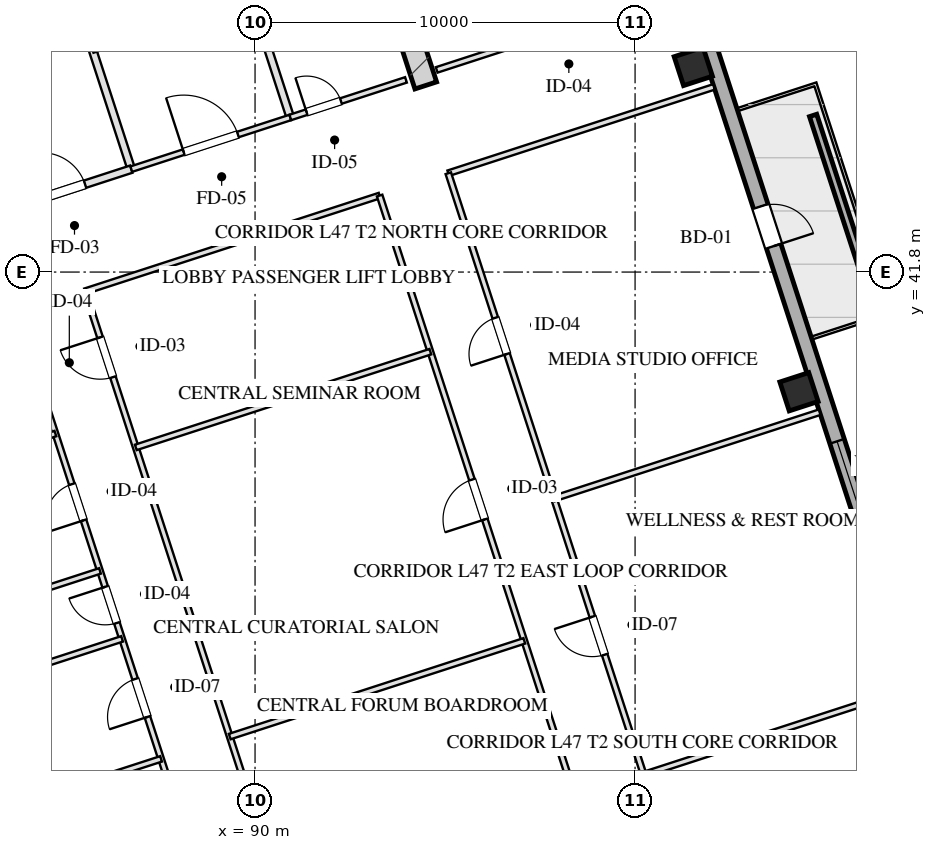
"""IFC4 building model, lengths in metres.
Left out: names, types, materials, properties, quantities, classifications, styles, units other than length and angle.
Written with IfcOpenShell. Run it as: python <this file> out.ifc"""

import sys

from ifc_helpers import new_model, si_unit, direction, frame, frame_2d, origin, origin_2d, place, context, subcontext, project, spatial, rectangle, hollow_rectangle, extrude, element, fill, save


model = new_model("IFC4")
c1 = context("Model", 3, precision=1e-05, world=origin(), true_north=direction((0.0, 1.0)))
c2 = subcontext(c1, "Body", "Model", "MODEL_VIEW")
j1 = project(units=[si_unit("LENGTHUNIT", "METRE"), si_unit("PLANEANGLEUNIT", "RADIAN")], contexts=[c1])
p1 = place(None, origin())
s1 = spatial("IfcSite", under=j1, at=p1, CompositionType="ELEMENT")
p2 = place(p1, origin())
s2 = spatial("IfcBuilding", under=s1, at=p2, CompositionType="ELEMENT")
p3 = place(p2, frame((0.0, 0.0, 177.1)))
s3 = spatial("IfcBuildingStorey", under=s2, at=p3, CompositionType="ELEMENT", Elevation=177.1)
p4 = place(p3, frame((94.492, 46.71, 0.0), z_axis=(0.0, 0.0, 1.0), x_axis=(-0.309010370028, 0.95105866865, 0.0)))
e1 = element("IfcWall", 1, at=p4, inside=s3, PredefinedType="SHEAR", context=c2, shape_type="SweptSolid", body=[
    extrude(rectangle(XDim=9.48, YDim=0.6, at=frame_2d((4.74, 0.0))), origin(), (0.0, 0.0, 1.0), 3.45),
])
for number, where, z_axis, x_axis in (
    (2, (104.313, 38.651, 0.0), (0.0, 0.0, 1.0), (0.951, 0.309, 0.0)),
    (3, (101.532, 47.21, 0.0), (0.0, 0.0, 1.0), (0.951, 0.309, 0.0)),
):
    element("IfcColumn", number, at=place(p3, frame(where, z_axis=z_axis, x_axis=x_axis)), inside=s3, PredefinedType="COLUMN", context=c2, shape_type="SweptSolid", body=[
        extrude(hollow_rectangle(XDim=0.8, YDim=0.8, WallThickness=0.028, at=origin_2d()), origin(), (0.0, 0.0, 1.0), 3.451),
    ])
p5 = place(p3, frame((98.224, 59.173, 0.0), z_axis=(0.0, 0.0, 1.0), x_axis=(0.309014228706, -0.951057414911, 0.0)))
e4 = element("IfcWall", 4, at=p5, inside=s3, PredefinedType="SOLIDWALL", context=c2, shape_type="SweptSolid", body=[
    extrude(rectangle(XDim=42.8, YDim=0.4, at=frame_2d((21.4, 0.0))), origin(), (0.0, 0.0, 1.0), 2.61),
])
p6 = place(p5, frame((26.75, 0.0, 0.75)))
e5 = element("IfcOpeningElement", 5, at=p6, cuts=e4, PredefinedType="OPENING", context=c2, shape_type="SweptSolid", body=[
    extrude(rectangle(XDim=2.1, YDim=1.46, at=frame_2d((1.05, 0.73))), frame((0.0, 0.21, 0.0), z_axis=(0.0, -1.0, 0.0), x_axis=(1.0, 0.0, 0.0)), (0.0, 0.0, 1.0), 0.42),
])
p7 = place(p5, frame((22.95, 0.0, 0.75)))
e6 = element("IfcOpeningElement", 6, at=p7, cuts=e4, PredefinedType="OPENING", context=c2, shape_type="SweptSolid", body=[
    extrude(rectangle(XDim=2.1, YDim=1.46, at=frame_2d((1.05, 0.73))), frame((0.0, 0.21, 0.0), z_axis=(0.0, -1.0, 0.0), x_axis=(1.0, 0.0, 0.0)), (0.0, 0.0, 1.0), 0.42),
])
p8 = place(p5, frame((16.45, 0.0, 0.0)))
e7 = element("IfcOpeningElement", 7, at=p8, cuts=e4, PredefinedType="OPENING", context=c2, shape_type="SweptSolid", body=[
    extrude(rectangle(XDim=1.1, YDim=2.15, at=frame_2d((0.55, 1.075))), frame((0.0, 0.21, 0.0), z_axis=(0.0, -1.0, 0.0), x_axis=(1.0, 0.0, 0.0)), (0.0, 0.0, 1.0), 0.42),
])
p9 = place(p3, frame((106.168, 41.356, 0.0), z_axis=(0.0, 0.0, 1.0), x_axis=(-0.309032019345, 0.951051634255, 0.0)))
e8 = element("IfcWall", 8, at=p9, inside=s3, PredefinedType="PARAPET", context=c2, shape_type="SweptSolid", body=[
    extrude(rectangle(XDim=4.8, YDim=0.2, at=frame_2d((2.4, 0.0))), origin(), (0.0, 0.0, 1.0), 0.75),
])
p10 = place(p3, frame((86.743, 44.508, 0.0), z_axis=(0.0, 0.0, 1.0), x_axis=(-0.309016001439, 0.951056838919, 0.0)))
e9 = element("IfcWall", 9, at=p10, inside=s3, PredefinedType="PARTITIONING", context=c2, shape_type="SweptSolid", body=[
    extrude(rectangle(XDim=8.43, YDim=0.2, at=frame_2d((4.215, 0.0))), origin(), (0.0, 0.0, 1.0), 3.175),
])
p11 = place(p3, frame((83.101, 43.324, 0.0), z_axis=(0.0, 0.0, 1.0), x_axis=(0.951052804469, 0.309028417967, 0.0)))
e10 = element("IfcWall", 10, at=p11, inside=s3, PredefinedType="PARTITIONING", context=c2, shape_type="SweptSolid", body=[
    extrude(rectangle(XDim=3.83, YDim=0.2, at=frame_2d((1.915, 0.0))), origin(), (0.0, 0.0, 1.0), 3.175),
])
p12 = place(p11, frame((1.35, 0.0, 0.0)))
e11 = element("IfcOpeningElement", 11, at=p12, cuts=e10, PredefinedType="OPENING", context=c2, shape_type="SweptSolid", body=[
    extrude(rectangle(XDim=1.2, YDim=2.05, at=frame_2d((0.6, 1.025))), frame((0.0, 0.11, 0.0), z_axis=(0.0, -1.0, 0.0), x_axis=(1.0, 0.0, 0.0)), (0.0, 0.0, 1.0), 0.22),
])
p13 = place(p3, frame((90.928, 45.868, 0.0), z_axis=(0.0, 0.0, 1.0), x_axis=(-0.309042196757, 0.951048327176, 0.0)))
e12 = element("IfcWall", 12, at=p13, inside=s3, PredefinedType="PARTITIONING", context=c2, shape_type="SweptSolid", body=[
    extrude(rectangle(XDim=8.43, YDim=0.2, at=frame_2d((4.215, 0.0))), origin(), (0.0, 0.0, 1.0), 3.175),
])
p14 = place(p3, frame((86.743, 44.508, 0.0), z_axis=(0.0, 0.0, 1.0), x_axis=(0.951063829732, 0.308994485023, 0.0)))
e13 = element("IfcWall", 13, at=p14, inside=s3, PredefinedType="PARTITIONING", context=c2, shape_type="SweptSolid", body=[
    extrude(rectangle(XDim=4.4, YDim=0.15, at=frame_2d((2.2, 0.0))), origin(), (0.0, 0.0, 1.0), 3.175),
])
p15 = place(p14, frame((1.45, 0.0, 0.0)))
e14 = element("IfcOpeningElement", 14, at=p15, cuts=e13, PredefinedType="OPENING", context=c2, shape_type="SweptSolid", body=[
    extrude(rectangle(XDim=1.5, YDim=2.05, at=frame_2d((0.75, 1.025))), frame((0.0, 0.085, 0.0), z_axis=(0.0, -1.0, 0.0), x_axis=(1.0, 0.0, 0.0)), (0.0, 0.0, 1.0), 0.17),
])
p16 = place(p3, frame((85.718, 47.666, 0.0), z_axis=(0.0, 0.0, 1.0), x_axis=(0.951058531764, 0.30901079133, 0.0)))
e15 = element("IfcWall", 15, at=p16, inside=s3, PredefinedType="PARTITIONING", context=c2, shape_type="SweptSolid", body=[
    extrude(rectangle(XDim=4.4, YDim=0.2, at=frame_2d((2.2, 0.0))), origin(), (0.0, 0.0, 1.0), 3.175),
])
p17 = place(p16, frame((0.45, 0.0, 0.0)))
e16 = element("IfcOpeningElement", 16, at=p17, cuts=e15, PredefinedType="OPENING", context=c2, shape_type="SweptSolid", body=[
    extrude(rectangle(XDim=1.1, YDim=2.05, at=frame_2d((0.55, 1.025))), frame((0.0, 0.11, 0.0), z_axis=(0.0, -1.0, 0.0), x_axis=(1.0, 0.0, 0.0)), (0.0, 0.0, 1.0), 0.22),
])
p18 = place(p16, frame((2.55, 0.0, 0.0)))
e17 = element("IfcOpeningElement", 17, at=p18, cuts=e15, PredefinedType="OPENING", context=c2, shape_type="SweptSolid", body=[
    extrude(rectangle(XDim=1.1, YDim=2.05, at=frame_2d((0.55, 1.025))), frame((0.0, 0.11, 0.0), z_axis=(0.0, -1.0, 0.0), x_axis=(1.0, 0.0, 0.0)), (0.0, 0.0, 1.0), 0.22),
])
p19 = place(p3, frame((90.928, 45.868, 0.0), z_axis=(0.0, 0.0, 1.0), x_axis=(0.951059297078, 0.309008435874, 0.0)))
e18 = element("IfcWall", 18, at=p19, inside=s3, PredefinedType="PARTITIONING", context=c2, shape_type="SweptSolid", body=[
    extrude(rectangle(XDim=3.2, YDim=0.15, at=frame_2d((1.6, 0.0))), origin(), (0.0, 0.0, 1.0), 3.175),
])
p20 = place(p19, frame((0.45, 0.0, 0.0)))
e19 = element("IfcOpeningElement", 19, at=p20, cuts=e18, PredefinedType="OPENING", context=c2, shape_type="SweptSolid", body=[
    extrude(rectangle(XDim=0.95, YDim=2.05, at=frame_2d((0.475, 1.025))), frame((0.0, 0.085, 0.0), z_axis=(0.0, -1.0, 0.0), x_axis=(1.0, 0.0, 0.0)), (0.0, 0.0, 1.0), 0.17),
])
p21 = place(p3, frame((94.78, 47.119, 0.0), z_axis=(0.0, 0.0, 1.0), x_axis=(0.951057811516, 0.309013008068, 0.0)))
e20 = element("IfcWall", 20, at=p21, inside=s3, PredefinedType="PARTITIONING", context=c2, shape_type="SweptSolid", body=[
    extrude(rectangle(XDim=6.8, YDim=0.15, at=frame_2d((3.4, 0.0))), origin(), (0.0, 0.0, 1.0), 3.175),
])
p22 = place(p21, frame((2.856, 0.0, 0.0)))
e21 = element("IfcOpeningElement", 21, at=p22, cuts=e20, PredefinedType="OPENING", context=c2, shape_type="SweptSolid", body=[
    extrude(rectangle(XDim=1.0, YDim=2.05, at=frame_2d((0.5, 1.025))), frame((0.0, 0.085, 0.0), z_axis=(0.0, -1.0, 0.0), x_axis=(1.0, 0.0, 0.0)), (0.0, 0.0, 1.0), 0.17),
])
p23 = place(p3, frame((100.227, 28.575, 0.0), z_axis=(0.0, 0.0, 1.0), x_axis=(0.95104773735, 0.309044011885, 0.0)))
e22 = element("IfcWall", 22, at=p23, inside=s3, PredefinedType="PARTITIONING", context=c2, shape_type="SweptSolid", body=[
    extrude(rectangle(XDim=7.35, YDim=0.15, at=frame_2d((3.675, 0.0))), origin(), (0.0, 0.0, 1.0), 3.175),
])
p24 = place(p3, frame((85.527, 41.295, 0.0), z_axis=(0.0, 0.0, 1.0), x_axis=(0.951055419664, 0.309020369437, 0.0)))
e23 = element("IfcWall", 23, at=p24, inside=s3, PredefinedType="PARTITIONING", context=c2, shape_type="SweptSolid", body=[
    extrude(rectangle(XDim=8.15, YDim=0.15, at=frame_2d((4.075, 0.0))), origin(), (0.0, 0.0, 1.0), 3.175),
])
p25 = place(p3, frame((95.085, 44.4, 0.0), z_axis=(0.0, 0.0, 1.0), x_axis=(0.95105749975, 0.309013967595, 0.0)))
e24 = element("IfcWall", 24, at=p25, inside=s3, PredefinedType="PARTITIONING", context=c2, shape_type="SweptSolid", body=[
    extrude(rectangle(XDim=7.35, YDim=0.15, at=frame_2d((3.675, 0.0))), origin(), (0.0, 0.0, 1.0), 3.175),
])
p26 = place(p3, frame((88.862, 24.882, 0.0), z_axis=(0.0, 0.0, 1.0), x_axis=(-0.309008771245, 0.951059188113, 0.0)))
e25 = element("IfcWall", 25, at=p26, inside=s3, PredefinedType="PARTITIONING", context=c2, shape_type="SweptSolid", body=[
    extrude(rectangle(XDim=16.64, YDim=0.15, at=frame_2d((8.32, 0.0))), origin(), (0.0, 0.0, 1.0), 3.175),
])
p27 = place(p26, frame((1.16, 0.0, 0.0)))
e26 = element("IfcOpeningElement", 26, at=p27, cuts=e25, PredefinedType="OPENING", context=c2, shape_type="SweptSolid", body=[
    extrude(rectangle(XDim=1.0, YDim=2.05, at=frame_2d((0.5, 1.025))), frame((0.0, 0.085, 0.0), z_axis=(0.0, -1.0, 0.0), x_axis=(1.0, 0.0, 0.0)), (0.0, 0.0, 1.0), 0.17),
])
p28 = place(p26, frame((5.48, 0.0, 0.0)))
e27 = element("IfcOpeningElement", 27, at=p28, cuts=e25, PredefinedType="OPENING", context=c2, shape_type="SweptSolid", body=[
    extrude(rectangle(XDim=1.05, YDim=2.05, at=frame_2d((0.525, 1.025))), frame((0.0, 0.085, 0.0), z_axis=(0.0, -1.0, 0.0), x_axis=(1.0, 0.0, 0.0)), (0.0, 0.0, 1.0), 0.17),
])
p29 = place(p26, frame((8.08, 0.0, 0.0)))
e28 = element("IfcOpeningElement", 28, at=p29, cuts=e25, PredefinedType="OPENING", context=c2, shape_type="SweptSolid", body=[
    extrude(rectangle(XDim=1.0, YDim=2.05, at=frame_2d((0.5, 1.025))), frame((0.0, 0.085, 0.0), z_axis=(0.0, -1.0, 0.0), x_axis=(1.0, 0.0, 0.0)), (0.0, 0.0, 1.0), 0.17),
])
p30 = place(p26, frame((10.92, 0.0, 0.0)))
e29 = element("IfcOpeningElement", 29, at=p30, cuts=e25, PredefinedType="OPENING", context=c2, shape_type="SweptSolid", body=[
    extrude(rectangle(XDim=1.0, YDim=2.05, at=frame_2d((0.5, 1.025))), frame((0.0, 0.085, 0.0), z_axis=(0.0, -1.0, 0.0), x_axis=(1.0, 0.0, 0.0)), (0.0, 0.0, 1.0), 0.17),
])
p31 = place(p26, frame((14.48, 0.0, 0.0)))
e30 = element("IfcOpeningElement", 30, at=p31, cuts=e25, PredefinedType="OPENING", context=c2, shape_type="SweptSolid", body=[
    extrude(rectangle(XDim=1.0, YDim=2.05, at=frame_2d((0.5, 1.025))), frame((0.0, 0.085, 0.0), z_axis=(0.0, -1.0, 0.0), x_axis=(1.0, 0.0, 0.0)), (0.0, 0.0, 1.0), 0.17),
])
p32 = place(p3, frame((90.669, 25.469, 0.0), z_axis=(0.0, 0.0, 1.0), x_axis=(-0.309022042254, 0.951054876125, 0.0)))
e31 = element("IfcWall", 31, at=p32, inside=s3, PredefinedType="PARTITIONING", context=c2, shape_type="SweptSolid", body=[
    extrude(rectangle(XDim=16.64, YDim=0.15, at=frame_2d((8.32, 0.0))), origin(), (0.0, 0.0, 1.0), 3.175),
])
p33 = place(p32, frame((1.944, 0.0, 0.0)))
e32 = element("IfcOpeningElement", 32, at=p33, cuts=e31, PredefinedType="OPENING", context=c2, shape_type="SweptSolid", body=[
    extrude(rectangle(XDim=1.1, YDim=2.05, at=frame_2d((0.55, 1.025))), frame((0.0, 0.085, 0.0), z_axis=(0.0, -1.0, 0.0), x_axis=(1.0, 0.0, 0.0)), (0.0, 0.0, 1.0), 0.17),
])
p34 = place(p32, frame((14.264, 0.0, 0.0)))
e33 = element("IfcOpeningElement", 33, at=p34, cuts=e31, PredefinedType="OPENING", context=c2, shape_type="SweptSolid", body=[
    extrude(rectangle(XDim=1.1, YDim=2.05, at=frame_2d((0.55, 1.025))), frame((0.0, 0.085, 0.0), z_axis=(0.0, -1.0, 0.0), x_axis=(1.0, 0.0, 0.0)), (0.0, 0.0, 1.0), 0.17),
])
p35 = place(p3, frame((98.42, 27.988, 0.0), z_axis=(0.0, 0.0, 1.0), x_axis=(-0.309004459387, 0.951060589068, 0.0)))
e34 = element("IfcWall", 34, at=p35, inside=s3, PredefinedType="PARTITIONING", context=c2, shape_type="SweptSolid", body=[
    extrude(rectangle(XDim=16.64, YDim=0.15, at=frame_2d((8.32, 0.0))), origin(), (0.0, 0.0, 1.0), 3.175),
])
p36 = place(p35, frame((7.68, 0.0, 0.0)))
e35 = element("IfcOpeningElement", 35, at=p36, cuts=e34, PredefinedType="OPENING", context=c2, shape_type="SweptSolid", body=[
    extrude(rectangle(XDim=1.1, YDim=2.05, at=frame_2d((0.55, 1.025))), frame((0.0, 0.085, 0.0), z_axis=(0.0, -1.0, 0.0), x_axis=(1.0, 0.0, 0.0)), (0.0, 0.0, 1.0), 0.17),
])
p37 = place(p3, frame((100.227, 28.575, 0.0), z_axis=(0.0, 0.0, 1.0), x_axis=(-0.30901773025, 0.951056277195, 0.0)))
e36 = element("IfcWall", 36, at=p37, inside=s3, PredefinedType="PARTITIONING", context=c2, shape_type="SweptSolid", body=[
    extrude(rectangle(XDim=16.64, YDim=0.15, at=frame_2d((8.32, 0.0))), origin(), (0.0, 0.0, 1.0), 3.175),
])
p38 = place(p37, frame((3.32, 0.0, 0.0)))
e37 = element("IfcOpeningElement", 37, at=p38, cuts=e36, PredefinedType="OPENING", context=c2, shape_type="SweptSolid", body=[
    extrude(rectangle(XDim=1.05, YDim=2.05, at=frame_2d((0.525, 1.025))), frame((0.0, 0.085, 0.0), z_axis=(0.0, -1.0, 0.0), x_axis=(1.0, 0.0, 0.0)), (0.0, 0.0, 1.0), 0.17),
])
p39 = place(p37, frame((11.64, 0.0, 0.0)))
e38 = element("IfcOpeningElement", 38, at=p39, cuts=e36, PredefinedType="OPENING", context=c2, shape_type="SweptSolid", body=[
    extrude(rectangle(XDim=1.0, YDim=2.05, at=frame_2d((0.5, 1.025))), frame((0.0, 0.085, 0.0), z_axis=(0.0, -1.0, 0.0), x_axis=(1.0, 0.0, 0.0)), (0.0, 0.0, 1.0), 0.17),
])
p40 = place(p3, frame((89.334, 29.578, 0.0), z_axis=(0.0, 0.0, 1.0), x_axis=(0.951052558989, 0.309029173445, 0.0)))
e39 = element("IfcWall", 39, at=p40, inside=s3, PredefinedType="PARTITIONING", context=c2, shape_type="SweptSolid", body=[
    extrude(rectangle(XDim=8.15, YDim=0.15, at=frame_2d((4.075, 0.0))), origin(), (0.0, 0.0, 1.0), 3.175),
])
p41 = place(p3, frame((86.862, 37.186, 0.0), z_axis=(0.0, 0.0, 1.0), x_axis=(0.95106422313, 0.308993274169, 0.0)))
e40 = element("IfcWall", 40, at=p41, inside=s3, PredefinedType="PARTITIONING", context=c2, shape_type="SweptSolid", body=[
    extrude(rectangle(XDim=8.15, YDim=0.15, at=frame_2d((4.075, 0.0))), origin(), (0.0, 0.0, 1.0), 3.175),
])
for number, where, z_axis, x_axis in (
    (41, (76.59, 25.437, 0.0), (0.0, 0.0, 1.0), (0.951, 0.309, 0.0)),
    (42, (75.564, 28.594, 0.0), (0.0, 0.0, 1.0), (0.951, 0.309, 0.0)),
):
    element("IfcWall", number, at=place(p3, frame(where, z_axis=z_axis, x_axis=x_axis)), inside=s3, PredefinedType="PARTITIONING", context=c2, shape_type="SweptSolid", body=[
        extrude(rectangle(XDim=11.5, YDim=0.15, at=frame_2d((5.75, 0.0))), origin(), (0.0, 0.0, 1.0), 3.175),
    ])
for number, where, z_axis, x_axis in (
    (43, (74.983, 30.382, 0.0), (0.0, 0.0, 1.0), (0.951, 0.309, 0.0)),
    (44, (73.809, 33.996, 0.0), (0.0, 0.0, 1.0), (0.951, 0.309, 0.0)),
):
    element("IfcWall", number, at=place(p3, frame(where, z_axis=z_axis, x_axis=x_axis)), inside=s3, PredefinedType="PARTITIONING", context=c2, shape_type="SweptSolid", body=[
        extrude(rectangle(XDim=11.5, YDim=0.15, at=frame_2d((5.75, 0.0))), origin(), (0.0, 0.0, 1.0), 3.175),
    ])
p42 = place(p3, frame((97.866, 35.841, 0.0), z_axis=(0.0, 0.0, 1.0), x_axis=(0.95105749975, 0.309013967595, 0.0)))
e45 = element("IfcWall", 45, at=p42, inside=s3, PredefinedType="PARTITIONING", context=c2, shape_type="SweptSolid", body=[
    extrude(rectangle(XDim=7.35, YDim=0.15, at=frame_2d((3.675, 0.0))), origin(), (0.0, 0.0, 1.0), 3.175),
])
p43 = place(p7, origin())
e46 = element("IfcWindow", 46, at=p43, inside=s3, PartitioningType="TRIPLE_PANEL_VERTICAL", PredefinedType="WINDOW", context=c2, shape_type="SweptSolid", body=[
    extrude(rectangle(XDim=2.1, YDim=1.46, at=frame_2d((1.05, 0.73))), frame((0.0, 0.03, 0.0), z_axis=(0.0, -1.0, 0.0), x_axis=(1.0, 0.0, 0.0)), (0.0, 0.0, 1.0), 0.06),
])
fill(e6, e46)
p44 = place(p8, origin())
e47 = element("IfcDoor", 47, at=p44, inside=s3, OperationType="SINGLE_SWING_RIGHT", PredefinedType="DOOR", context=c2, shape_type="SweptSolid", body=[
    extrude(rectangle(XDim=1.1, YDim=2.15, at=frame_2d((0.55, 1.075))), frame((0.0, 0.025, 0.0), z_axis=(0.0, -1.0, 0.0), x_axis=(1.0, 0.0, 0.0)), (0.0, 0.0, 1.0), 0.05),
])
fill(e7, e47)
p45 = place(p12, origin())
e48 = element("IfcDoor", 48, at=p45, inside=s3, OperationType="SINGLE_SWING_LEFT", PredefinedType="DOOR", context=c2, shape_type="SweptSolid", body=[
    extrude(rectangle(XDim=1.2, YDim=2.05, at=frame_2d((0.6, 1.025))), frame((0.0, 0.025, 0.0), z_axis=(0.0, -1.0, 0.0), x_axis=(1.0, 0.0, 0.0)), (0.0, 0.0, 1.0), 0.05),
])
fill(e11, e48)
p46 = place(p15, origin())
e49 = element("IfcDoor", 49, at=p46, inside=s3, OperationType="SINGLE_SWING_LEFT", PredefinedType="DOOR", context=c2, shape_type="SweptSolid", body=[
    extrude(rectangle(XDim=1.5, YDim=2.05, at=frame_2d((0.75, 1.025))), frame((0.0, 0.025, 0.0), z_axis=(0.0, -1.0, 0.0), x_axis=(1.0, 0.0, 0.0)), (0.0, 0.0, 1.0), 0.05),
])
fill(e14, e49)
p47 = place(p20, origin())
e50 = element("IfcDoor", 50, at=p47, inside=s3, OperationType="SINGLE_SWING_LEFT", PredefinedType="DOOR", context=c2, shape_type="SweptSolid", body=[
    extrude(rectangle(XDim=0.95, YDim=2.05, at=frame_2d((0.475, 1.025))), frame((0.0, 0.025, 0.0), z_axis=(0.0, -1.0, 0.0), x_axis=(1.0, 0.0, 0.0)), (0.0, 0.0, 1.0), 0.05),
])
fill(e19, e50)
p48 = place(p28, origin())
e51 = element("IfcDoor", 51, at=p48, inside=s3, OperationType="SINGLE_SWING_LEFT", PredefinedType="DOOR", context=c2, shape_type="SweptSolid", body=[
    extrude(rectangle(XDim=1.05, YDim=2.05, at=frame_2d((0.525, 1.025))), frame((0.0, 0.025, 0.0), z_axis=(0.0, -1.0, 0.0), x_axis=(1.0, 0.0, 0.0)), (0.0, 0.0, 1.0), 0.05),
])
fill(e27, e51)
p49 = place(p29, origin())
e52 = element("IfcDoor", 52, at=p49, inside=s3, OperationType="SINGLE_SWING_RIGHT", PredefinedType="DOOR", context=c2, shape_type="SweptSolid", body=[
    extrude(rectangle(XDim=1.0, YDim=2.05, at=frame_2d((0.5, 1.025))), frame((0.0, 0.025, 0.0), z_axis=(0.0, -1.0, 0.0), x_axis=(1.0, 0.0, 0.0)), (0.0, 0.0, 1.0), 0.05),
])
fill(e28, e52)
p50 = place(p30, origin())
e53 = element("IfcDoor", 53, at=p50, inside=s3, OperationType="SINGLE_SWING_LEFT", PredefinedType="DOOR", context=c2, shape_type="SweptSolid", body=[
    extrude(rectangle(XDim=1.0, YDim=2.05, at=frame_2d((0.5, 1.025))), frame((0.0, 0.025, 0.0), z_axis=(0.0, -1.0, 0.0), x_axis=(1.0, 0.0, 0.0)), (0.0, 0.0, 1.0), 0.05),
])
fill(e29, e53)
p51 = place(p34, origin())
e54 = element("IfcDoor", 54, at=p51, inside=s3, OperationType="SINGLE_SWING_RIGHT", PredefinedType="DOOR", context=c2, shape_type="SweptSolid", body=[
    extrude(rectangle(XDim=1.1, YDim=2.05, at=frame_2d((0.55, 1.025))), frame((0.0, 0.025, 0.0), z_axis=(0.0, -1.0, 0.0), x_axis=(1.0, 0.0, 0.0)), (0.0, 0.0, 1.0), 0.05),
])
fill(e33, e54)
p52 = place(p36, origin())
e55 = element("IfcDoor", 55, at=p52, inside=s3, OperationType="SINGLE_SWING_LEFT", PredefinedType="DOOR", context=c2, shape_type="SweptSolid", body=[
    extrude(rectangle(XDim=1.1, YDim=2.05, at=frame_2d((0.55, 1.025))), frame((0.0, 0.025, 0.0), z_axis=(0.0, -1.0, 0.0), x_axis=(1.0, 0.0, 0.0)), (0.0, 0.0, 1.0), 0.05),
])
fill(e35, e55)
p53 = place(p38, origin())
e56 = element("IfcDoor", 56, at=p53, inside=s3, OperationType="SINGLE_SWING_RIGHT", PredefinedType="DOOR", context=c2, shape_type="SweptSolid", body=[
    extrude(rectangle(XDim=1.05, YDim=2.05, at=frame_2d((0.525, 1.025))), frame((0.0, 0.025, 0.0), z_axis=(0.0, -1.0, 0.0), x_axis=(1.0, 0.0, 0.0)), (0.0, 0.0, 1.0), 0.05),
])
fill(e37, e56)
p54 = place(p39, origin())
e57 = element("IfcDoor", 57, at=p54, inside=s3, OperationType="SINGLE_SWING_LEFT", PredefinedType="DOOR", context=c2, shape_type="SweptSolid", body=[
    extrude(rectangle(XDim=1.0, YDim=2.05, at=frame_2d((0.5, 1.025))), frame((0.0, 0.025, 0.0), z_axis=(0.0, -1.0, 0.0), x_axis=(1.0, 0.0, 0.0)), (0.0, 0.0, 1.0), 0.05),
])
fill(e38, e57)
save(model, sys.argv[1])
